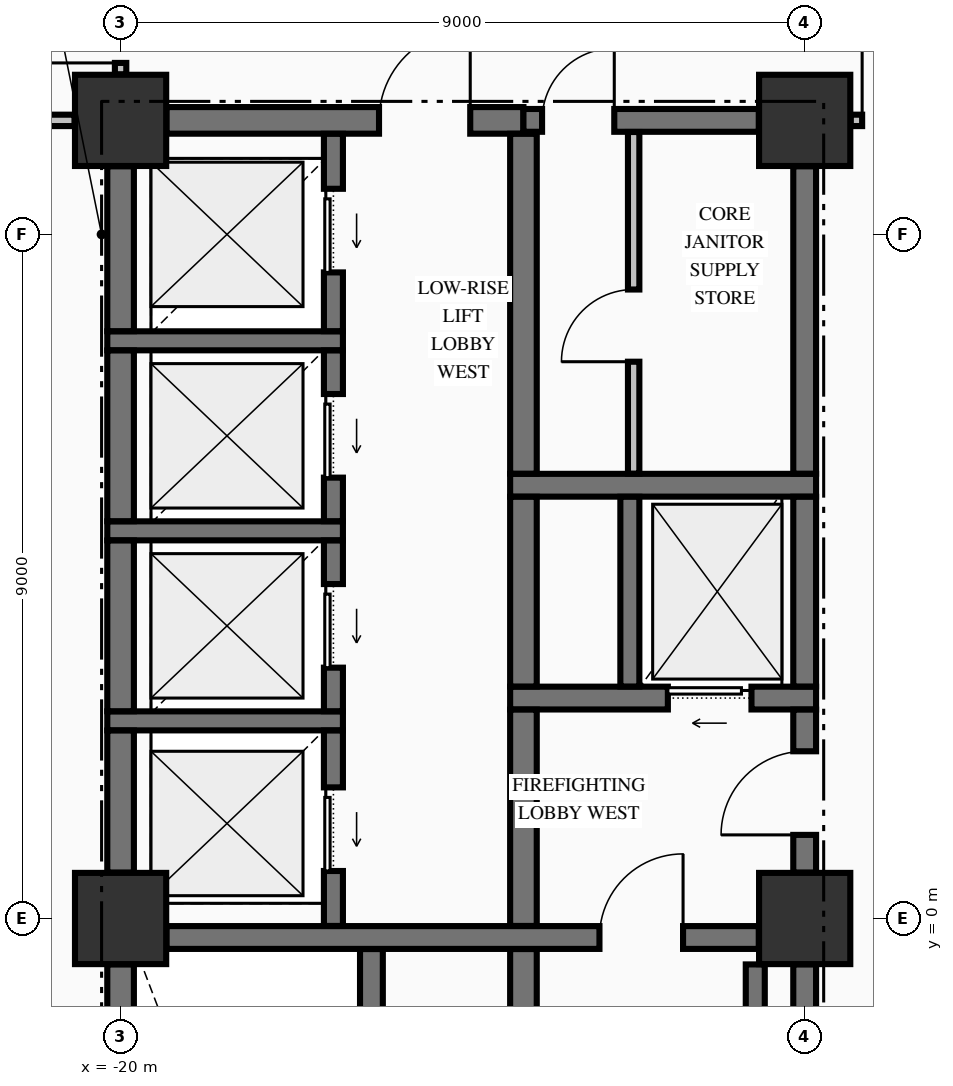
"""IFC4 building model, lengths in metres.
Left out: names, types, materials, properties, quantities, classifications, styles, units other than length and angle.
Written with IfcOpenShell. Run it as: python <this file> out.ifc"""

import sys

from ifc_helpers import new_model, si_unit, direction, frame, frame_2d, origin, origin_2d, place, context, subcontext, project, spatial, rectangle, extrude, element, fill, save


model = new_model("IFC4")
c1 = context("Model", 3, precision=1e-05, world=origin(), true_north=direction((0.0, 1.0)))
c2 = subcontext(c1, "Body", "Model", "MODEL_VIEW")
j1 = project(units=[si_unit("LENGTHUNIT", "METRE"), si_unit("PLANEANGLEUNIT", "RADIAN")], contexts=[c1])
p1 = place(None, origin())
s1 = spatial("IfcSite", under=j1, at=p1, CompositionType="ELEMENT")
p2 = place(p1, origin())
s2 = spatial("IfcBuilding", under=s1, at=p2, CompositionType="ELEMENT")
p3 = place(p2, frame((0.0, 0.0, 34.34)))
s3 = spatial("IfcBuildingStorey", under=s2, at=p3, CompositionType="ELEMENT", Elevation=34.34)
for number, where, z_axis, x_axis in (
    (1, (-20.0, 10.5, -0.3), (0.0, 0.0, 1.0), (1.0, 0.0, 0.0)),
    (2, (-11.0, 0.0, -0.3), (0.0, 0.0, 1.0), (1.0, 0.0, 0.0)),
    (3, (-11.0, 10.5, -0.3), (0.0, 0.0, 1.0), (1.0, 0.0, 0.0)),
    (4, (-20.0, 0.0, -0.3), (0.0, 0.0, 1.0), (1.0, 0.0, 0.0)),
):
    element("IfcColumn", number, at=place(p3, frame(where, z_axis=z_axis, x_axis=x_axis)), inside=s3, PredefinedType="COLUMN", context=c2, shape_type="SweptSolid", body=[
        extrude(rectangle(XDim=1.2, YDim=1.2, at=origin_2d()), origin(), (0.0, 0.0, 1.0), 3.62),
    ])
p4 = place(p3, frame((-19.396, -0.25, 0.0), z_axis=(0.0, 0.0, 1.0), x_axis=(1.0, 0.0, 0.0)))
e5 = element("IfcWall", 5, at=p4, inside=s3, PredefinedType="SHEAR", context=c2, shape_type="SweptSolid", body=[
    extrude(rectangle(XDim=7.792, YDim=0.3, at=frame_2d((3.896, 0.0))), origin(), (0.0, 0.0, 1.0), 3.32),
])
p5 = place(p4, frame((5.696, 0.0, 0.0)))
e6 = element("IfcOpeningElement", 6, at=p5, cuts=e5, PredefinedType="OPENING", context=c2, shape_type="SweptSolid", body=[
    extrude(rectangle(XDim=1.1, YDim=2.15, at=frame_2d((0.55, 1.075))), frame((0.0, 0.16, 0.0), z_axis=(0.0, -1.0, 0.0), x_axis=(1.0, 0.0, 0.0)), (0.0, 0.0, 1.0), 0.32),
])
p6 = place(p3, frame((-20.175, 2.6, 0.0), z_axis=(0.0, 0.0, 1.0), x_axis=(1.0, 0.0, 0.0)))
e7 = element("IfcWall", 7, at=p6, inside=s3, PredefinedType="SOLIDWALL", context=c2, shape_type="SweptSolid", body=[
    extrude(rectangle(XDim=3.1, YDim=0.25, at=frame_2d((1.55, 0.0))), origin(), (0.0, 0.0, 1.0), 3.32),
])
p7 = place(p3, frame((-14.875, 2.9, 0.0), z_axis=(0.0, 0.0, 1.0), x_axis=(1.0, 0.0, 0.0)))
e8 = element("IfcWall", 8, at=p7, inside=s3, PredefinedType="SHEAR", context=c2, shape_type="SweptSolid", body=[
    extrude(rectangle(XDim=4.025, YDim=0.3, at=frame_2d((2.012, 0.0))), origin(), (0.0, 0.0, 1.0), 3.32),
])
p8 = place(p7, frame((2.075, 0.0, 0.0)))
e9 = element("IfcOpeningElement", 9, at=p8, cuts=e8, PredefinedType="OPENING", context=c2, shape_type="SweptSolid", body=[
    extrude(rectangle(XDim=1.1, YDim=2.2, at=frame_2d((0.55, 1.1))), frame((0.0, 0.16, 0.0), z_axis=(0.0, -1.0, 0.0), x_axis=(1.0, 0.0, 0.0)), (0.0, 0.0, 1.0), 0.32),
])
p9 = place(p3, frame((-20.175, 5.1, 0.0), z_axis=(0.0, 0.0, 1.0), x_axis=(1.0, 0.0, 0.0)))
e10 = element("IfcWall", 10, at=p9, inside=s3, PredefinedType="SOLIDWALL", context=c2, shape_type="SweptSolid", body=[
    extrude(rectangle(XDim=3.1, YDim=0.25, at=frame_2d((1.55, 0.0))), origin(), (0.0, 0.0, 1.0), 3.32),
])
p10 = place(p3, frame((-14.875, 5.7, 0.0), z_axis=(0.0, 0.0, 1.0), x_axis=(1.0, 0.0, 0.0)))
e11 = element("IfcWall", 11, at=p10, inside=s3, PredefinedType="SHEAR", context=c2, shape_type="SweptSolid", body=[
    extrude(rectangle(XDim=4.025, YDim=0.3, at=frame_2d((2.012, 0.0))), origin(), (0.0, 0.0, 1.0), 3.32),
])
p11 = place(p3, frame((-20.175, 7.6, 0.0), z_axis=(0.0, 0.0, 1.0), x_axis=(1.0, 0.0, 0.0)))
e12 = element("IfcWall", 12, at=p11, inside=s3, PredefinedType="SOLIDWALL", context=c2, shape_type="SweptSolid", body=[
    extrude(rectangle(XDim=3.1, YDim=0.25, at=frame_2d((1.55, 0.0))), origin(), (0.0, 0.0, 1.0), 3.32),
])
p12 = place(p3, frame((-19.396, 10.5, 0.0), z_axis=(0.0, 0.0, 1.0), x_axis=(1.0, 0.0, 0.0)))
e13 = element("IfcWall", 13, at=p12, inside=s3, PredefinedType="SHEAR", context=c2, shape_type="SweptSolid", body=[
    extrude(rectangle(XDim=4.696, YDim=0.35, at=frame_2d((2.348, 0.0))), origin(), (0.0, 0.0, 1.0), 3.32),
])
p13 = place(p12, frame((2.796, 0.0, 0.0)))
e14 = element("IfcOpeningElement", 14, at=p13, cuts=e13, PredefinedType="OPENING", context=c2, shape_type="SweptSolid", body=[
    extrude(rectangle(XDim=1.2, YDim=2.15, at=frame_2d((0.6, 1.075))), frame((0.0, 0.185, 0.0), z_axis=(0.0, -1.0, 0.0), x_axis=(1.0, 0.0, 0.0)), (0.0, 0.0, 1.0), 0.37),
])
p14 = place(p3, frame((-14.7, 10.5, 0.0), z_axis=(0.0, 0.0, 1.0), x_axis=(1.0, 0.0, 0.0)))
e15 = element("IfcWall", 15, at=p14, inside=s3, PredefinedType="SHEAR", context=c2, shape_type="SweptSolid", body=[
    extrude(rectangle(XDim=3.096, YDim=0.3, at=frame_2d((1.548, 0.0))), origin(), (0.0, 0.0, 1.0), 3.32),
])
p15 = place(p14, frame((0.245, 0.0, 0.0)))
e16 = element("IfcOpeningElement", 16, at=p15, cuts=e15, PredefinedType="OPENING", context=c2, shape_type="SweptSolid", body=[
    extrude(rectangle(XDim=0.95, YDim=2.15, at=frame_2d((0.475, 1.075))), frame((0.0, 0.16, 0.0), z_axis=(0.0, -1.0, 0.0), x_axis=(1.0, 0.0, 0.0)), (0.0, 0.0, 1.0), 0.32),
])
p16 = place(p3, frame((-23.835, 10.5, 0.0), z_axis=(0.0, 0.0, 1.0), x_axis=(1.0, 0.0, 0.0)))
e17 = element("IfcWall", 17, at=p16, inside=s3, PredefinedType="PARTITIONING", context=c2, shape_type="SweptSolid", body=[
    extrude(rectangle(XDim=3.229, YDim=0.15, at=frame_2d((1.615, 0.0))), origin(), (0.0, 0.0, 1.0), 3.32),
])
p17 = place(p16, frame((1.36, 0.0, 0.0)))
e18 = element("IfcOpeningElement", 18, at=p17, cuts=e17, PredefinedType="OPENING", context=c2, shape_type="SweptSolid", body=[
    extrude(rectangle(XDim=0.95, YDim=2.15, at=frame_2d((0.475, 1.075))), frame((0.0, 0.085, 0.0), z_axis=(0.0, -1.0, 0.0), x_axis=(1.0, 0.0, 0.0)), (0.0, 0.0, 1.0), 0.17),
])
p18 = place(p3, frame((-10.394, 10.5, 0.0), z_axis=(0.0, 0.0, 1.0), x_axis=(1.0, 0.0, 0.0)))
e19 = element("IfcWall", 19, at=p18, inside=s3, PredefinedType="PARTITIONING", context=c2, shape_type="SweptSolid", body=[
    extrude(rectangle(XDim=20.788, YDim=0.15, at=frame_2d((10.394, 0.0))), origin(), (0.0, 0.0, 1.0), 3.32),
])
p19 = place(p18, frame((0.15, 0.0, 0.0)))
e20 = element("IfcOpeningElement", 20, at=p19, cuts=e19, PredefinedType="OPENING", context=c2, shape_type="SweptSolid", body=[
    extrude(rectangle(XDim=1.05, YDim=2.15, at=frame_2d((0.525, 1.075))), frame((0.0, 0.085, 0.0), z_axis=(0.0, -1.0, 0.0), x_axis=(1.0, 0.0, 0.0)), (0.0, 0.0, 1.0), 0.17),
])
p20 = place(p18, frame((19.588, 0.0, 0.0)))
e21 = element("IfcOpeningElement", 21, at=p20, cuts=e19, PredefinedType="OPENING", context=c2, shape_type="SweptSolid", body=[
    extrude(rectangle(XDim=1.05, YDim=2.15, at=frame_2d((0.525, 1.075))), frame((0.0, 0.085, 0.0), z_axis=(0.0, -1.0, 0.0), x_axis=(1.0, 0.0, 0.0)), (0.0, 0.0, 1.0), 0.17),
])
p21 = place(p3, frame((-20.0, -9.346, 0.0), z_axis=(0.0, 0.0, 1.0), x_axis=(0.0, 1.0, 0.0)))
e22 = element("IfcWall", 22, at=p21, inside=s3, PredefinedType="SHEAR", context=c2, shape_type="SweptSolid", body=[
    extrude(rectangle(XDim=8.742, YDim=0.35, at=frame_2d((4.371, 0.0))), origin(), (0.0, 0.0, 1.0), 3.32),
])
p22 = place(p3, frame((-20.0, 0.604, 0.0), z_axis=(0.0, 0.0, 1.0), x_axis=(0.0, 1.0, 0.0)))
e23 = element("IfcWall", 23, at=p22, inside=s3, PredefinedType="SHEAR", context=c2, shape_type="SweptSolid", body=[
    extrude(rectangle(XDim=1.869, YDim=0.35, at=frame_2d((0.935, 0.0))), origin(), (0.0, 0.0, 1.0), 3.32),
])
for number, where, z_axis, x_axis in (
    (24, (-20.0, 2.727, 0.0), (0.0, 0.0, 1.0), (0.0, 1.0, 0.0)),
    (25, (-20.0, 5.227, 0.0), (0.0, 0.0, 1.0), (0.0, 1.0, 0.0)),
):
    element("IfcWall", number, at=place(p3, frame(where, z_axis=z_axis, x_axis=x_axis)), inside=s3, PredefinedType="SHEAR", context=c2, shape_type="SweptSolid", body=[
        extrude(rectangle(XDim=2.246, YDim=0.35, at=frame_2d((1.123, 0.0))), origin(), (0.0, 0.0, 1.0), 3.32),
    ])
p23 = place(p3, frame((-20.0, 7.727, 0.0), z_axis=(0.0, 0.0, 1.0), x_axis=(0.0, 1.0, 0.0)))
e26 = element("IfcWall", 26, at=p23, inside=s3, PredefinedType="SHEAR", context=c2, shape_type="SweptSolid", body=[
    extrude(rectangle(XDim=2.169, YDim=0.35, at=frame_2d((1.084, 0.0))), origin(), (0.0, 0.0, 1.0), 3.32),
])
p24 = place(p3, frame((-17.2, -0.098, 0.0), z_axis=(0.0, 0.0, 1.0), x_axis=(0.0, 1.0, 0.0)))
e27 = element("IfcWall", 27, at=p24, inside=s3, PredefinedType="SOLIDWALL", context=c2, shape_type="SweptSolid", body=[
    extrude(rectangle(XDim=2.571, YDim=0.25, at=frame_2d((1.285, 0.0))), origin(), (0.0, 0.0, 1.0), 3.32),
])
p25 = place(p24, frame((0.723, 0.0, 0.0)))
e28 = element("IfcOpeningElement", 28, at=p25, cuts=e27, PredefinedType="OPENING", context=c2, shape_type="SweptSolid", body=[
    extrude(rectangle(XDim=1.1, YDim=2.2, at=frame_2d((0.55, 1.1))), frame((0.0, 0.135, 0.0), z_axis=(0.0, -1.0, 0.0), x_axis=(1.0, 0.0, 0.0)), (0.0, 0.0, 1.0), 0.27),
])
p26 = place(p3, frame((-17.2, 2.727, 0.0), z_axis=(0.0, 0.0, 1.0), x_axis=(0.0, 1.0, 0.0)))
e29 = element("IfcWall", 29, at=p26, inside=s3, PredefinedType="SOLIDWALL", context=c2, shape_type="SweptSolid", body=[
    extrude(rectangle(XDim=2.246, YDim=0.25, at=frame_2d((1.123, 0.0))), origin(), (0.0, 0.0, 1.0), 3.32),
])
p27 = place(p26, frame((0.573, 0.0, 0.0)))
e30 = element("IfcOpeningElement", 30, at=p27, cuts=e29, PredefinedType="OPENING", context=c2, shape_type="SweptSolid", body=[
    extrude(rectangle(XDim=1.1, YDim=2.2, at=frame_2d((0.55, 1.1))), frame((0.0, 0.135, 0.0), z_axis=(0.0, -1.0, 0.0), x_axis=(1.0, 0.0, 0.0)), (0.0, 0.0, 1.0), 0.27),
])
p28 = place(p3, frame((-17.2, 5.227, 0.0), z_axis=(0.0, 0.0, 1.0), x_axis=(0.0, 1.0, 0.0)))
e31 = element("IfcWall", 31, at=p28, inside=s3, PredefinedType="SOLIDWALL", context=c2, shape_type="SweptSolid", body=[
    extrude(rectangle(XDim=2.246, YDim=0.25, at=frame_2d((1.123, 0.0))), origin(), (0.0, 0.0, 1.0), 3.32),
])
p29 = place(p28, frame((0.573, 0.0, 0.0)))
e32 = element("IfcOpeningElement", 32, at=p29, cuts=e31, PredefinedType="OPENING", context=c2, shape_type="SweptSolid", body=[
    extrude(rectangle(XDim=1.1, YDim=2.2, at=frame_2d((0.55, 1.1))), frame((0.0, 0.135, 0.0), z_axis=(0.0, -1.0, 0.0), x_axis=(1.0, 0.0, 0.0)), (0.0, 0.0, 1.0), 0.27),
])
p30 = place(p3, frame((-17.2, 7.727, 0.0), z_axis=(0.0, 0.0, 1.0), x_axis=(0.0, 1.0, 0.0)))
e33 = element("IfcWall", 33, at=p30, inside=s3, PredefinedType="SOLIDWALL", context=c2, shape_type="SweptSolid", body=[
    extrude(rectangle(XDim=2.596, YDim=0.25, at=frame_2d((1.298, 0.0))), origin(), (0.0, 0.0, 1.0), 3.32),
])
p31 = place(p30, frame((0.773, 0.0, 0.0)))
e34 = element("IfcOpeningElement", 34, at=p31, cuts=e33, PredefinedType="OPENING", context=c2, shape_type="SweptSolid", body=[
    extrude(rectangle(XDim=1.1, YDim=2.2, at=frame_2d((0.55, 1.1))), frame((0.0, 0.135, 0.0), z_axis=(0.0, -1.0, 0.0), x_axis=(1.0, 0.0, 0.0)), (0.0, 0.0, 1.0), 0.27),
])
p32 = place(p3, frame((-16.7, -9.773, 0.0), z_axis=(0.0, 0.0, 1.0), x_axis=(0.0, 1.0, 0.0)))
e35 = element("IfcWall", 35, at=p32, inside=s3, PredefinedType="SHEAR", context=c2, shape_type="SweptSolid", body=[
    extrude(rectangle(XDim=9.371, YDim=0.3, at=frame_2d((4.686, 0.0))), origin(), (0.0, 0.0, 1.0), 3.32),
])
p33 = place(p3, frame((-14.7, -9.773, 0.0), z_axis=(0.0, 0.0, 1.0), x_axis=(0.0, 1.0, 0.0)))
e36 = element("IfcWall", 36, at=p33, inside=s3, PredefinedType="SHEAR", context=c2, shape_type="SweptSolid", body=[
    extrude(rectangle(XDim=9.371, YDim=0.35, at=frame_2d((4.686, 0.0))), origin(), (0.0, 0.0, 1.0), 3.32),
])
p34 = place(p3, frame((-14.7, -0.098, 0.0), z_axis=(0.0, 0.0, 1.0), x_axis=(0.0, 1.0, 0.0)))
e37 = element("IfcWall", 37, at=p34, inside=s3, PredefinedType="SHEAR", context=c2, shape_type="SweptSolid", body=[
    extrude(rectangle(XDim=2.846, YDim=0.35, at=frame_2d((1.423, 0.0))), origin(), (0.0, 0.0, 1.0), 3.32),
])
p35 = place(p3, frame((-14.7, 3.052, 0.0), z_axis=(0.0, 0.0, 1.0), x_axis=(0.0, 1.0, 0.0)))
e38 = element("IfcWall", 38, at=p35, inside=s3, PredefinedType="SHEAR", context=c2, shape_type="SweptSolid", body=[
    extrude(rectangle(XDim=2.496, YDim=0.35, at=frame_2d((1.248, 0.0))), origin(), (0.0, 0.0, 1.0), 3.32),
])
p36 = place(p3, frame((-14.7, 5.852, 0.0), z_axis=(0.0, 0.0, 1.0), x_axis=(0.0, 1.0, 0.0)))
e39 = element("IfcWall", 39, at=p36, inside=s3, PredefinedType="SHEAR", context=c2, shape_type="SweptSolid", body=[
    extrude(rectangle(XDim=4.471, YDim=0.35, at=frame_2d((2.235, 0.0))), origin(), (0.0, 0.0, 1.0), 3.32),
])
p37 = place(p3, frame((-13.3, 3.052, 0.0), z_axis=(0.0, 0.0, 1.0), x_axis=(0.0, 1.0, 0.0)))
e40 = element("IfcWall", 40, at=p37, inside=s3, PredefinedType="SOLIDWALL", context=c2, shape_type="SweptSolid", body=[
    extrude(rectangle(XDim=2.496, YDim=0.25, at=frame_2d((1.248, 0.0))), origin(), (0.0, 0.0, 1.0), 3.32),
])
p38 = place(p3, frame((-11.65, -9.346, 0.0), z_axis=(0.0, 0.0, 1.0), x_axis=(0.0, 1.0, 0.0)))
e41 = element("IfcWall", 41, at=p38, inside=s3, PredefinedType="SOLIDWALL", context=c2, shape_type="SweptSolid", body=[
    extrude(rectangle(XDim=8.742, YDim=0.25, at=frame_2d((4.371, 0.0))), origin(), (0.0, 0.0, 1.0), 3.32),
])
p39 = place(p3, frame((-11.0, -9.346, 0.0), z_axis=(0.0, 0.0, 1.0), x_axis=(0.0, 1.0, 0.0)))
e42 = element("IfcWall", 42, at=p39, inside=s3, PredefinedType="SHEAR", context=c2, shape_type="SweptSolid", body=[
    extrude(rectangle(XDim=8.742, YDim=0.3, at=frame_2d((4.371, 0.0))), origin(), (0.0, 0.0, 1.0), 3.32),
])
p40 = place(p3, frame((-11.0, 0.604, 0.0), z_axis=(0.0, 0.0, 1.0), x_axis=(0.0, 1.0, 0.0)))
e43 = element("IfcWall", 43, at=p40, inside=s3, PredefinedType="SHEAR", context=c2, shape_type="SweptSolid", body=[
    extrude(rectangle(XDim=2.144, YDim=0.3, at=frame_2d((1.072, 0.0))), origin(), (0.0, 0.0, 1.0), 3.32),
])
p41 = place(p40, frame((0.496, 0.0, 0.0)))
e44 = element("IfcOpeningElement", 44, at=p41, cuts=e43, PredefinedType="OPENING", context=c2, shape_type="SweptSolid", body=[
    extrude(rectangle(XDim=1.1, YDim=2.15, at=frame_2d((0.55, 1.075))), frame((0.0, 0.16, 0.0), z_axis=(0.0, -1.0, 0.0), x_axis=(1.0, 0.0, 0.0)), (0.0, 0.0, 1.0), 0.32),
])
p42 = place(p3, frame((-11.0, 3.052, 0.0), z_axis=(0.0, 0.0, 1.0), x_axis=(0.0, 1.0, 0.0)))
e45 = element("IfcWall", 45, at=p42, inside=s3, PredefinedType="SHEAR", context=c2, shape_type="SweptSolid", body=[
    extrude(rectangle(XDim=2.496, YDim=0.3, at=frame_2d((1.248, 0.0))), origin(), (0.0, 0.0, 1.0), 3.32),
])
p43 = place(p3, frame((-11.0, 5.852, 0.0), z_axis=(0.0, 0.0, 1.0), x_axis=(0.0, 1.0, 0.0)))
e46 = element("IfcWall", 46, at=p43, inside=s3, PredefinedType="SHEAR", context=c2, shape_type="SweptSolid", body=[
    extrude(rectangle(XDim=4.044, YDim=0.3, at=frame_2d((2.022, 0.0))), origin(), (0.0, 0.0, 1.0), 3.32),
])
p44 = place(p3, frame((-20.0, 11.106, 0.0), z_axis=(0.0, 0.0, 1.0), x_axis=(0.0, 1.0, 0.0)))
e47 = element("IfcWall", 47, at=p44, inside=s3, PredefinedType="PARTITIONING", context=c2, shape_type="SweptSolid", body=[
    extrude(rectangle(XDim=1.366, YDim=0.15, at=frame_2d((0.683, 0.0))), origin(), (0.0, 0.0, 1.0), 3.32),
])
p45 = place(p44, frame((0.15, 0.0, 0.0)))
e48 = element("IfcOpeningElement", 48, at=p45, cuts=e47, PredefinedType="OPENING", context=c2, shape_type="SweptSolid", body=[
    extrude(rectangle(XDim=0.95, YDim=2.15, at=frame_2d((0.475, 1.075))), frame((0.0, 0.085, 0.0), z_axis=(0.0, -1.0, 0.0), x_axis=(1.0, 0.0, 0.0)), (0.0, 0.0, 1.0), 0.17),
])
p46 = place(p3, frame((-13.25, 5.853, 0.0), z_axis=(0.0, 0.0, 1.0), x_axis=(0.0, 1.0, 0.0)))
e49 = element("IfcWall", 49, at=p46, inside=s3, PredefinedType="PARTITIONING", context=c2, shape_type="SweptSolid", body=[
    extrude(rectangle(XDim=4.494, YDim=0.15, at=frame_2d((2.247, 0.0))), origin(), (0.0, 0.0, 1.0), 3.32),
])
p47 = place(p46, frame((1.472, 0.0, 0.0)))
e50 = element("IfcOpeningElement", 50, at=p47, cuts=e49, PredefinedType="OPENING", context=c2, shape_type="SweptSolid", body=[
    extrude(rectangle(XDim=0.95, YDim=2.15, at=frame_2d((0.475, 1.075))), frame((0.0, 0.085, 0.0), z_axis=(0.0, -1.0, 0.0), x_axis=(1.0, 0.0, 0.0)), (0.0, 0.0, 1.0), 0.17),
])
p48 = place(p5, origin())
e51 = element("IfcDoor", 51, at=p48, inside=s3, OperationType="SINGLE_SWING_RIGHT", PredefinedType="DOOR", context=c2, shape_type="SweptSolid", body=[
    extrude(rectangle(XDim=1.1, YDim=2.15, at=frame_2d((0.55, 1.075))), frame((0.0, 0.025, 0.0), z_axis=(0.0, -1.0, 0.0), x_axis=(1.0, 0.0, 0.0)), (0.0, 0.0, 1.0), 0.05),
])
fill(e6, e51)
p49 = place(p41, origin())
e52 = element("IfcDoor", 52, at=p49, inside=s3, OperationType="SINGLE_SWING_LEFT", PredefinedType="DOOR", context=c2, shape_type="SweptSolid", body=[
    extrude(rectangle(XDim=1.1, YDim=2.15, at=frame_2d((0.55, 1.075))), frame((0.0, 0.025, 0.0), z_axis=(0.0, -1.0, 0.0), x_axis=(1.0, 0.0, 0.0)), (0.0, 0.0, 1.0), 0.05),
])
fill(e44, e52)
p50 = place(p8, origin())
e53 = element("IfcDoor", 53, at=p50, inside=s3, OperationType="SLIDING_TO_LEFT", PredefinedType="DOOR", context=c2, shape_type="SweptSolid", body=[
    extrude(rectangle(XDim=1.1, YDim=2.2, at=frame_2d((0.55, 1.1))), frame((0.0, 0.025, 0.0), z_axis=(0.0, -1.0, 0.0), x_axis=(1.0, 0.0, 0.0)), (0.0, 0.0, 1.0), 0.05),
])
fill(e9, e53)
p51 = place(p15, origin())
e54 = element("IfcDoor", 54, at=p51, inside=s3, OperationType="SINGLE_SWING_RIGHT", PredefinedType="DOOR", context=c2, shape_type="SweptSolid", body=[
    extrude(rectangle(XDim=0.95, YDim=2.15, at=frame_2d((0.475, 1.075))), frame((0.0, 0.025, 0.0), z_axis=(0.0, -1.0, 0.0), x_axis=(1.0, 0.0, 0.0)), (0.0, 0.0, 1.0), 0.05),
])
fill(e16, e54)
p52 = place(p47, origin())
e55 = element("IfcDoor", 55, at=p52, inside=s3, OperationType="SINGLE_SWING_LEFT", PredefinedType="DOOR", context=c2, shape_type="SweptSolid", body=[
    extrude(rectangle(XDim=0.95, YDim=2.15, at=frame_2d((0.475, 1.075))), frame((0.0, 0.025, 0.0), z_axis=(0.0, -1.0, 0.0), x_axis=(1.0, 0.0, 0.0)), (0.0, 0.0, 1.0), 0.05),
])
fill(e50, e55)
p53 = place(p13, origin())
e56 = element("IfcDoor", 56, at=p53, inside=s3, OperationType="SINGLE_SWING_RIGHT", PredefinedType="DOOR", context=c2, shape_type="SweptSolid", body=[
    extrude(rectangle(XDim=1.2, YDim=2.15, at=frame_2d((0.6, 1.075))), frame((0.0, 0.025, 0.0), z_axis=(0.0, -1.0, 0.0), x_axis=(1.0, 0.0, 0.0)), (0.0, 0.0, 1.0), 0.05),
])
fill(e14, e56)
p54 = place(p25, origin())
e57 = element("IfcDoor", 57, at=p54, inside=s3, OperationType="SLIDING_TO_LEFT", PredefinedType="DOOR", context=c2, shape_type="SweptSolid", body=[
    extrude(rectangle(XDim=1.1, YDim=2.2, at=frame_2d((0.55, 1.1))), frame((0.0, 0.025, 0.0), z_axis=(0.0, -1.0, 0.0), x_axis=(1.0, 0.0, 0.0)), (0.0, 0.0, 1.0), 0.05),
])
fill(e28, e57)
p55 = place(p27, origin())
e58 = element("IfcDoor", 58, at=p55, inside=s3, OperationType="SLIDING_TO_LEFT", PredefinedType="DOOR", context=c2, shape_type="SweptSolid", body=[
    extrude(rectangle(XDim=1.1, YDim=2.2, at=frame_2d((0.55, 1.1))), frame((0.0, 0.025, 0.0), z_axis=(0.0, -1.0, 0.0), x_axis=(1.0, 0.0, 0.0)), (0.0, 0.0, 1.0), 0.05),
])
fill(e30, e58)
p56 = place(p29, origin())
e59 = element("IfcDoor", 59, at=p56, inside=s3, OperationType="SLIDING_TO_LEFT", PredefinedType="DOOR", context=c2, shape_type="SweptSolid", body=[
    extrude(rectangle(XDim=1.1, YDim=2.2, at=frame_2d((0.55, 1.1))), frame((0.0, 0.025, 0.0), z_axis=(0.0, -1.0, 0.0), x_axis=(1.0, 0.0, 0.0)), (0.0, 0.0, 1.0), 0.05),
])
fill(e32, e59)
p57 = place(p31, origin())
e60 = element("IfcDoor", 60, at=p57, inside=s3, OperationType="SLIDING_TO_LEFT", PredefinedType="DOOR", context=c2, shape_type="SweptSolid", body=[
    extrude(rectangle(XDim=1.1, YDim=2.2, at=frame_2d((0.55, 1.1))), frame((0.0, 0.025, 0.0), z_axis=(0.0, -1.0, 0.0), x_axis=(1.0, 0.0, 0.0)), (0.0, 0.0, 1.0), 0.05),
])
fill(e34, e60)
p58 = place(p19, origin())
e61 = element("IfcDoor", 61, at=p58, inside=s3, OperationType="SINGLE_SWING_LEFT", PredefinedType="DOOR", context=c2, shape_type="SweptSolid", body=[
    extrude(rectangle(XDim=1.05, YDim=2.15, at=frame_2d((0.525, 1.075))), frame((0.0, 0.025, 0.0), z_axis=(0.0, -1.0, 0.0), x_axis=(1.0, 0.0, 0.0)), (0.0, 0.0, 1.0), 0.05),
])
fill(e20, e61)
p59 = place(p45, origin())
e62 = element("IfcDoor", 62, at=p59, inside=s3, OperationType="SINGLE_SWING_LEFT", PredefinedType="DOOR", context=c2, shape_type="SweptSolid", body=[
    extrude(rectangle(XDim=0.95, YDim=2.15, at=frame_2d((0.475, 1.075))), frame((0.0, 0.025, 0.0), z_axis=(0.0, -1.0, 0.0), x_axis=(1.0, 0.0, 0.0)), (0.0, 0.0, 1.0), 0.05),
])
fill(e48, e62)
save(model, sys.argv[1])
